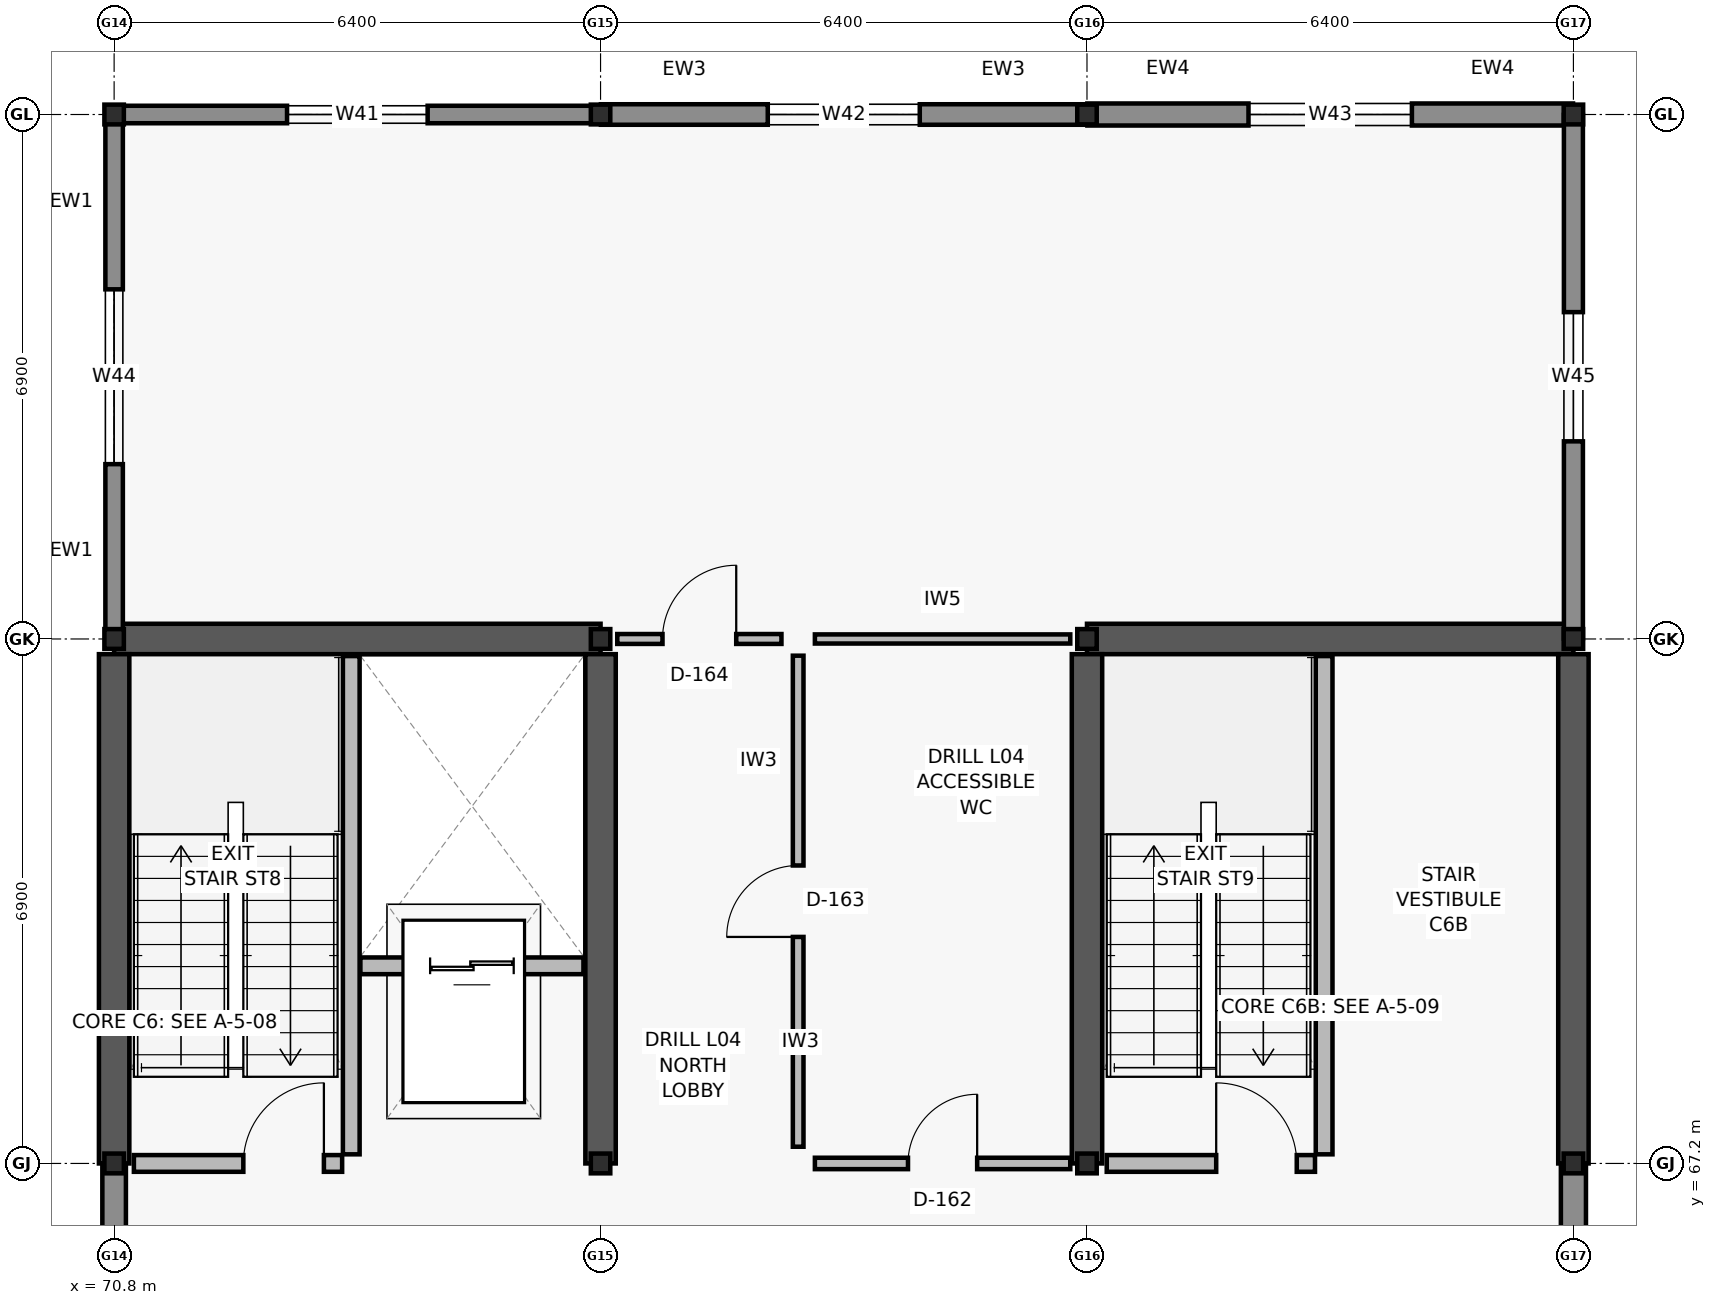
"""IFC4 building model, lengths in metres.
Left out: names, types, materials, properties, quantities, classifications, styles, units other than length and angle.
Written with IfcOpenShell. Run it as: python <this file> out.ifc"""

import sys

from ifc_helpers import new_model, si_unit, direction, frame, frame_2d, origin, origin_2d, place, context, subcontext, project, spatial, rectangle, i_section, extrude, element, fill, save


model = new_model("IFC4")
c1 = context("Model", 3, precision=1e-05, world=origin(), true_north=direction((0.0, 1.0)))
c2 = subcontext(c1, "Body", "Model", "MODEL_VIEW")
j1 = project(units=[si_unit("LENGTHUNIT", "METRE"), si_unit("PLANEANGLEUNIT", "RADIAN")], contexts=[c1])
p1 = place(None, origin())
s1 = spatial("IfcSite", under=j1, at=p1, CompositionType="ELEMENT")
p2 = place(p1, origin())
s2 = spatial("IfcBuilding", under=s1, at=p2, CompositionType="ELEMENT")
p3 = place(p2, frame((0.0, 0.0, 17.4)))
s3 = spatial("IfcBuildingStorey", under=s2, at=p3, CompositionType="ELEMENT", Elevation=17.4)
for number, where, z_axis, x_axis in (
    (1, (70.8, 67.2, 0.0), (0.0, 0.0, 1.0), (1.0, 0.0, 0.0)),
    (2, (70.8, 74.1, 0.0), (0.0, 0.0, 1.0), (1.0, 0.0, 0.0)),
    (3, (70.8, 81.0, 0.0), (0.0, 0.0, 1.0), (1.0, 0.0, 0.0)),
    (4, (77.2, 67.2, 0.0), (0.0, 0.0, 1.0), (1.0, 0.0, 0.0)),
    (5, (77.2, 74.1, 0.0), (0.0, 0.0, 1.0), (1.0, 0.0, 0.0)),
    (6, (77.2, 81.0, 0.0), (0.0, 0.0, 1.0), (1.0, 0.0, 0.0)),
    (7, (83.6, 67.2, 0.0), (0.0, 0.0, 1.0), (1.0, 0.0, 0.0)),
    (8, (83.6, 74.1, 0.0), (0.0, 0.0, 1.0), (1.0, 0.0, 0.0)),
    (9, (83.6, 81.0, 0.0), (0.0, 0.0, 1.0), (1.0, 0.0, 0.0)),
    (10, (90.0, 67.2, 0.0), (0.0, 0.0, 1.0), (1.0, 0.0, 0.0)),
    (11, (90.0, 74.1, 0.0), (0.0, 0.0, 1.0), (1.0, 0.0, 0.0)),
    (12, (90.0, 81.0, 0.0), (0.0, 0.0, 1.0), (1.0, 0.0, 0.0)),
):
    element("IfcColumn", number, at=place(p3, frame(where, z_axis=z_axis, x_axis=x_axis)), inside=s3, PredefinedType="COLUMN", context=c2, shape_type="SweptSolid", body=[
        extrude(i_section(OverallWidth=0.256, OverallDepth=0.26, WebThickness=0.01, FlangeThickness=0.017, FilletRadius=0.013, at=origin_2d()), origin(), (0.0, 0.0, 1.0), 3.9),
    ])
p4 = place(p3, frame((70.8, 74.1, 0.0), z_axis=(0.0, 0.0, 1.0), x_axis=(1.0, 0.0, 0.0)))
e13 = element("IfcWall", 13, at=p4, inside=s3, PredefinedType="SHEAR", context=c2, shape_type="SweptSolid", body=[
    extrude(rectangle(XDim=6.4, YDim=0.4, at=frame_2d((3.2, 0.0))), origin(), (0.0, 0.0, 1.0), 3.66),
])
for number, where, z_axis, x_axis in (
    (14, (70.8, 67.2, 0.0), (0.0, 0.0, 1.0), (0.0, 1.0, 0.0)),
    (15, (77.2, 67.2, 0.0), (0.0, 0.0, 1.0), (0.0, 1.0, 0.0)),
):
    element("IfcWall", number, at=place(p3, frame(where, z_axis=z_axis, x_axis=x_axis)), inside=s3, PredefinedType="SHEAR", context=c2, shape_type="SweptSolid", body=[
        extrude(rectangle(XDim=6.7, YDim=0.4, at=frame_2d((3.35, 0.0))), origin(), (0.0, 0.0, 1.0), 3.66),
    ])
p5 = place(p3, frame((83.6, 74.1, 0.0), z_axis=(0.0, 0.0, 1.0), x_axis=(1.0, 0.0, 0.0)))
e16 = element("IfcWall", 16, at=p5, inside=s3, PredefinedType="SHEAR", context=c2, shape_type="SweptSolid", body=[
    extrude(rectangle(XDim=6.4, YDim=0.4, at=frame_2d((3.2, 0.0))), origin(), (0.0, 0.0, 1.0), 3.66),
])
for number, where, z_axis, x_axis in (
    (17, (83.6, 67.2, 0.0), (0.0, 0.0, 1.0), (0.0, 1.0, 0.0)),
    (18, (90.0, 67.2, 0.0), (0.0, 0.0, 1.0), (0.0, 1.0, 0.0)),
):
    element("IfcWall", number, at=place(p3, frame(where, z_axis=z_axis, x_axis=x_axis)), inside=s3, PredefinedType="SHEAR", context=c2, shape_type="SweptSolid", body=[
        extrude(rectangle(XDim=6.7, YDim=0.4, at=frame_2d((3.35, 0.0))), origin(), (0.0, 0.0, 1.0), 3.66),
    ])
p6 = place(p3, frame((70.805, 81.0, 0.0), z_axis=(0.0, 0.0, 1.0), x_axis=(1.0, 0.0, 0.0)))
e19 = element("IfcWall", 19, at=p6, inside=s3, PredefinedType="SOLIDWALL", context=c2, shape_type="SweptSolid", body=[
    extrude(rectangle(XDim=6.39, YDim=0.23, at=frame_2d((3.195, 0.0))), origin(), (0.0, 0.0, 1.0), 3.02),
])
p7 = place(p6, frame((2.27, 0.0, 0.8)))
e20 = element("IfcOpeningElement", 20, at=p7, cuts=e19, PredefinedType="OPENING", context=c2, shape_type="SweptSolid", body=[
    extrude(rectangle(XDim=1.85, YDim=1.55, at=frame_2d((0.925, 0.775))), frame((0.0, 0.125, 0.0), z_axis=(0.0, -1.0, 0.0), x_axis=(1.0, 0.0, 0.0)), (0.0, 0.0, 1.0), 0.25),
])
p8 = place(p3, frame((77.205, 81.0, 0.0), z_axis=(0.0, 0.0, 1.0), x_axis=(1.0, 0.0, 0.0)))
e21 = element("IfcWall", 21, at=p8, inside=s3, PredefinedType="SOLIDWALL", context=c2, shape_type="SweptSolid", body=[
    extrude(rectangle(XDim=6.39, YDim=0.27, at=frame_2d((3.195, 0.0))), origin(), (0.0, 0.0, 1.0), 3.02),
])
p9 = place(p8, frame((2.195, 0.0, 0.8)))
e22 = element("IfcOpeningElement", 22, at=p9, cuts=e21, PredefinedType="OPENING", context=c2, shape_type="SweptSolid", body=[
    extrude(rectangle(XDim=2.0, YDim=1.55, at=frame_2d((1.0, 0.775))), frame((0.0, 0.145, 0.0), z_axis=(0.0, -1.0, 0.0), x_axis=(1.0, 0.0, 0.0)), (0.0, 0.0, 1.0), 0.29),
])
p10 = place(p3, frame((83.605, 81.0, 0.0), z_axis=(0.0, 0.0, 1.0), x_axis=(1.0, 0.0, 0.0)))
e23 = element("IfcWall", 23, at=p10, inside=s3, PredefinedType="SOLIDWALL", context=c2, shape_type="SweptSolid", body=[
    extrude(rectangle(XDim=6.39, YDim=0.29, at=frame_2d((3.195, 0.0))), origin(), (0.0, 0.0, 1.0), 3.02),
])
p11 = place(p10, frame((2.12, 0.0, 0.8)))
e24 = element("IfcOpeningElement", 24, at=p11, cuts=e23, PredefinedType="OPENING", context=c2, shape_type="SweptSolid", body=[
    extrude(rectangle(XDim=2.15, YDim=1.55, at=frame_2d((1.075, 0.775))), frame((0.0, 0.155, 0.0), z_axis=(0.0, -1.0, 0.0), x_axis=(1.0, 0.0, 0.0)), (0.0, 0.0, 1.0), 0.31),
])
p12 = place(p3, frame((70.8, 60.305, 0.0), z_axis=(0.0, 0.0, 1.0), x_axis=(0.0, 1.0, 0.0)))
e25 = element("IfcWall", 25, at=p12, inside=s3, PredefinedType="SOLIDWALL", context=c2, shape_type="SweptSolid", body=[
    extrude(rectangle(XDim=6.89, YDim=0.31, at=frame_2d((3.445, 0.0))), origin(), (0.0, 0.0, 1.0), 3.02),
])
p13 = place(p3, frame((90.0, 67.195, 0.0), z_axis=(0.0, 0.0, 1.0), x_axis=(0.0, -1.0, 0.0)))
e26 = element("IfcWall", 26, at=p13, inside=s3, PredefinedType="SOLIDWALL", context=c2, shape_type="SweptSolid", body=[
    extrude(rectangle(XDim=6.89, YDim=0.33, at=frame_2d((3.445, 0.0))), origin(), (0.0, 0.0, 1.0), 3.02),
])
p14 = place(p3, frame((70.8, 74.105, 0.0), z_axis=(0.0, 0.0, 1.0), x_axis=(0.0, 1.0, 0.0)))
e27 = element("IfcWall", 27, at=p14, inside=s3, PredefinedType="SOLIDWALL", context=c2, shape_type="SweptSolid", body=[
    extrude(rectangle(XDim=6.89, YDim=0.23, at=frame_2d((3.445, 0.0))), origin(), (0.0, 0.0, 1.0), 3.02),
])
p15 = place(p14, frame((2.295, 0.0, 0.8)))
e28 = element("IfcOpeningElement", 28, at=p15, cuts=e27, PredefinedType="OPENING", context=c2, shape_type="SweptSolid", body=[
    extrude(rectangle(XDim=2.3, YDim=1.55, at=frame_2d((1.15, 0.775))), frame((0.0, 0.125, 0.0), z_axis=(0.0, -1.0, 0.0), x_axis=(1.0, 0.0, 0.0)), (0.0, 0.0, 1.0), 0.25),
])
p16 = place(p3, frame((90.0, 80.995, 0.0), z_axis=(0.0, 0.0, 1.0), x_axis=(0.0, -1.0, 0.0)))
e29 = element("IfcWall", 29, at=p16, inside=s3, PredefinedType="SOLIDWALL", context=c2, shape_type="SweptSolid", body=[
    extrude(rectangle(XDim=6.89, YDim=0.25, at=frame_2d((3.445, 0.0))), origin(), (0.0, 0.0, 1.0), 3.02),
])
p17 = place(p16, frame((2.595, 0.0, 0.8)))
e30 = element("IfcOpeningElement", 30, at=p17, cuts=e29, PredefinedType="OPENING", context=c2, shape_type="SweptSolid", body=[
    extrude(rectangle(XDim=1.7, YDim=1.95, at=frame_2d((0.85, 0.975))), frame((0.0, 0.135, 0.0), z_axis=(0.0, -1.0, 0.0), x_axis=(1.0, 0.0, 0.0)), (0.0, 0.0, 1.0), 0.27),
])
p18 = place(p3, frame((73.92, 67.32, 0.0), z_axis=(0.0, 0.0, 1.0), x_axis=(0.0, 1.0, 0.0)))
e31 = element("IfcWall", 31, at=p18, inside=s3, PredefinedType="SOLIDWALL", context=c2, shape_type="SweptSolid", body=[
    extrude(rectangle(XDim=6.555, YDim=0.22, at=frame_2d((3.277, 0.0))), origin(), (0.0, 0.0, 1.0), 3.66),
])
p19 = place(p3, frame((71.06, 67.2, 0.0), z_axis=(0.0, 0.0, 1.0), x_axis=(1.0, 0.0, 0.0)))
e32 = element("IfcWall", 32, at=p19, inside=s3, PredefinedType="SOLIDWALL", context=c2, shape_type="SweptSolid", body=[
    extrude(rectangle(XDim=2.74, YDim=0.22, at=frame_2d((1.37, 0.0))), origin(), (0.0, 0.0, 1.0), 3.02),
])
p20 = place(p19, frame((1.44, 0.0, 0.0)))
e33 = element("IfcOpeningElement", 33, at=p20, cuts=e32, PredefinedType="OPENING", context=c2, shape_type="SweptSolid", body=[
    extrude(rectangle(XDim=1.06, YDim=2.1, at=frame_2d((0.53, 1.05))), frame((0.0, 0.12, 0.0), z_axis=(0.0, -1.0, 0.0), x_axis=(1.0, 0.0, 0.0)), (0.0, 0.0, 1.0), 0.24),
])
p21 = place(p3, frame((74.04, 69.8, 0.0), z_axis=(0.0, 0.0, 1.0), x_axis=(1.0, 0.0, 0.0)))
e34 = element("IfcWall", 34, at=p21, inside=s3, PredefinedType="SOLIDWALL", context=c2, shape_type="SweptSolid", body=[
    extrude(rectangle(XDim=2.935, YDim=0.22, at=frame_2d((1.468, 0.0))), origin(), (0.0, 0.0, 1.0), 3.66),
])
p22 = place(p21, frame((0.917, 0.0, 0.0)))
e35 = element("IfcOpeningElement", 35, at=p22, cuts=e34, PredefinedType="OPENING", context=c2, shape_type="SweptSolid", body=[
    extrude(rectangle(XDim=1.1, YDim=2.1, at=frame_2d((0.55, 1.05))), frame((0.0, 0.12, 0.0), z_axis=(0.0, -1.0, 0.0), x_axis=(1.0, 0.0, 0.0)), (0.0, 0.0, 1.0), 0.24),
])
p23 = place(p3, frame((86.72, 67.32, 0.0), z_axis=(0.0, 0.0, 1.0), x_axis=(0.0, 1.0, 0.0)))
e36 = element("IfcWall", 36, at=p23, inside=s3, PredefinedType="SOLIDWALL", context=c2, shape_type="SweptSolid", body=[
    extrude(rectangle(XDim=6.555, YDim=0.22, at=frame_2d((3.277, 0.0))), origin(), (0.0, 0.0, 1.0), 3.66),
])
p24 = place(p3, frame((83.86, 67.2, 0.0), z_axis=(0.0, 0.0, 1.0), x_axis=(1.0, 0.0, 0.0)))
e37 = element("IfcWall", 37, at=p24, inside=s3, PredefinedType="SOLIDWALL", context=c2, shape_type="SweptSolid", body=[
    extrude(rectangle(XDim=2.74, YDim=0.22, at=frame_2d((1.37, 0.0))), origin(), (0.0, 0.0, 1.0), 3.02),
])
p25 = place(p24, frame((1.44, 0.0, 0.0)))
e38 = element("IfcOpeningElement", 38, at=p25, cuts=e37, PredefinedType="OPENING", context=c2, shape_type="SweptSolid", body=[
    extrude(rectangle(XDim=1.06, YDim=2.1, at=frame_2d((0.53, 1.05))), frame((0.0, 0.12, 0.0), z_axis=(0.0, -1.0, 0.0), x_axis=(1.0, 0.0, 0.0)), (0.0, 0.0, 1.0), 0.24),
])
p26 = place(p3, frame((80.02, 67.2, 0.0), z_axis=(0.0, 0.0, 1.0), x_axis=(1.0, 0.0, 0.0)))
e39 = element("IfcWall", 39, at=p26, inside=s3, PredefinedType="PARTITIONING", context=c2, shape_type="SweptSolid", body=[
    extrude(rectangle(XDim=3.36, YDim=0.15, at=frame_2d((1.68, 0.0))), origin(), (0.0, 0.0, 1.0), 3.0),
])
p27 = place(p26, frame((1.225, 0.0, 0.0)))
e40 = element("IfcOpeningElement", 40, at=p27, cuts=e39, PredefinedType="OPENING", context=c2, shape_type="SweptSolid", body=[
    extrude(rectangle(XDim=0.91, YDim=2.06, at=frame_2d((0.455, 1.03))), frame((0.0, 0.085, 0.0), z_axis=(0.0, -1.0, 0.0), x_axis=(1.0, 0.0, 0.0)), (0.0, 0.0, 1.0), 0.17),
])
p28 = place(p3, frame((79.8, 67.42, 0.0), z_axis=(0.0, 0.0, 1.0), x_axis=(0.0, 1.0, 0.0)))
e41 = element("IfcWall", 41, at=p28, inside=s3, PredefinedType="PARTITIONING", context=c2, shape_type="SweptSolid", body=[
    extrude(rectangle(XDim=6.46, YDim=0.14, at=frame_2d((3.23, 0.0))), origin(), (0.0, 0.0, 1.0), 3.0),
])
p29 = place(p28, frame((2.76, 0.0, 0.0)))
e42 = element("IfcOpeningElement", 42, at=p29, cuts=e41, PredefinedType="OPENING", context=c2, shape_type="SweptSolid", body=[
    extrude(rectangle(XDim=0.94, YDim=2.08, at=frame_2d((0.47, 1.04))), frame((0.0, 0.08, 0.0), z_axis=(0.0, -1.0, 0.0), x_axis=(1.0, 0.0, 0.0)), (0.0, 0.0, 1.0), 0.16),
])
p30 = place(p3, frame((77.42, 74.1, 0.0), z_axis=(0.0, 0.0, 1.0), x_axis=(1.0, 0.0, 0.0)))
e43 = element("IfcWall", 43, at=p30, inside=s3, PredefinedType="PARTITIONING", context=c2, shape_type="SweptSolid", body=[
    extrude(rectangle(XDim=2.16, YDim=0.13, at=frame_2d((1.08, 0.0))), origin(), (0.0, 0.0, 1.0), 3.0),
])
p31 = place(p30, frame((0.595, 0.0, 0.0)))
e44 = element("IfcOpeningElement", 44, at=p31, cuts=e43, PredefinedType="OPENING", context=c2, shape_type="SweptSolid", body=[
    extrude(rectangle(XDim=0.97, YDim=2.1, at=frame_2d((0.485, 1.05))), frame((0.0, 0.075, 0.0), z_axis=(0.0, -1.0, 0.0), x_axis=(1.0, 0.0, 0.0)), (0.0, 0.0, 1.0), 0.15),
])
p32 = place(p3, frame((80.02, 74.1, 0.0), z_axis=(0.0, 0.0, 1.0), x_axis=(1.0, 0.0, 0.0)))
e45 = element("IfcWall", 45, at=p32, inside=s3, PredefinedType="PARTITIONING", context=c2, shape_type="SweptSolid", body=[
    extrude(rectangle(XDim=3.36, YDim=0.12, at=frame_2d((1.68, 0.0))), origin(), (0.0, 0.0, 1.0), 3.0),
])
p33 = place(p7, origin())
e46 = element("IfcWindow", 46, at=p33, inside=s3, PartitioningType="DOUBLE_PANEL_VERTICAL", PredefinedType="WINDOW", context=c2, shape_type="SweptSolid", body=[
    extrude(rectangle(XDim=1.85, YDim=1.55, at=frame_2d((0.925, 0.775))), frame((0.0, 0.03, 0.0), z_axis=(0.0, -1.0, 0.0), x_axis=(1.0, 0.0, 0.0)), (0.0, 0.0, 1.0), 0.06),
])
fill(e20, e46)
p34 = place(p9, origin())
e47 = element("IfcWindow", 47, at=p34, inside=s3, PartitioningType="DOUBLE_PANEL_VERTICAL", PredefinedType="WINDOW", context=c2, shape_type="SweptSolid", body=[
    extrude(rectangle(XDim=2.0, YDim=1.55, at=frame_2d((1.0, 0.775))), frame((0.0, 0.03, 0.0), z_axis=(0.0, -1.0, 0.0), x_axis=(1.0, 0.0, 0.0)), (0.0, 0.0, 1.0), 0.06),
])
fill(e22, e47)
p35 = place(p11, origin())
e48 = element("IfcWindow", 48, at=p35, inside=s3, PartitioningType="DOUBLE_PANEL_VERTICAL", PredefinedType="WINDOW", context=c2, shape_type="SweptSolid", body=[
    extrude(rectangle(XDim=2.15, YDim=1.55, at=frame_2d((1.075, 0.775))), frame((0.0, 0.03, 0.0), z_axis=(0.0, -1.0, 0.0), x_axis=(1.0, 0.0, 0.0)), (0.0, 0.0, 1.0), 0.06),
])
fill(e24, e48)
p36 = place(p15, origin())
e49 = element("IfcWindow", 49, at=p36, inside=s3, PartitioningType="DOUBLE_PANEL_VERTICAL", PredefinedType="WINDOW", context=c2, shape_type="SweptSolid", body=[
    extrude(rectangle(XDim=2.3, YDim=1.55, at=frame_2d((1.15, 0.775))), frame((0.0, 0.03, 0.0), z_axis=(0.0, -1.0, 0.0), x_axis=(1.0, 0.0, 0.0)), (0.0, 0.0, 1.0), 0.06),
])
fill(e28, e49)
p37 = place(p17, origin())
e50 = element("IfcWindow", 50, at=p37, inside=s3, PartitioningType="DOUBLE_PANEL_VERTICAL", PredefinedType="WINDOW", context=c2, shape_type="SweptSolid", body=[
    extrude(rectangle(XDim=1.7, YDim=1.95, at=frame_2d((0.85, 0.975))), frame((0.0, 0.03, 0.0), z_axis=(0.0, -1.0, 0.0), x_axis=(1.0, 0.0, 0.0)), (0.0, 0.0, 1.0), 0.06),
])
fill(e30, e50)
p38 = place(p20, origin())
e51 = element("IfcDoor", 51, at=p38, inside=s3, OperationType="SINGLE_SWING_RIGHT", PredefinedType="DOOR", context=c2, shape_type="SweptSolid", body=[
    extrude(rectangle(XDim=1.06, YDim=2.1, at=frame_2d((0.53, 1.05))), frame((0.0, 0.025, 0.0), z_axis=(0.0, -1.0, 0.0), x_axis=(1.0, 0.0, 0.0)), (0.0, 0.0, 1.0), 0.05),
])
fill(e33, e51)
p39 = place(p22, origin())
e52 = element("IfcDoor", 52, at=p39, inside=s3, OperationType="DOUBLE_DOOR_SLIDING", PredefinedType="DOOR", context=c2, shape_type="SweptSolid", body=[
    extrude(rectangle(XDim=1.1, YDim=2.1, at=frame_2d((0.55, 1.05))), frame((0.0, 0.025, 0.0), z_axis=(0.0, -1.0, 0.0), x_axis=(1.0, 0.0, 0.0)), (0.0, 0.0, 1.0), 0.05),
])
fill(e35, e52)
p40 = place(p25, origin())
e53 = element("IfcDoor", 53, at=p40, inside=s3, OperationType="SINGLE_SWING_LEFT", PredefinedType="DOOR", context=c2, shape_type="SweptSolid", body=[
    extrude(rectangle(XDim=1.06, YDim=2.1, at=frame_2d((0.53, 1.05))), frame((0.0, 0.025, 0.0), z_axis=(0.0, -1.0, 0.0), x_axis=(1.0, 0.0, 0.0)), (0.0, 0.0, 1.0), 0.05),
])
fill(e38, e53)
p41 = place(p27, origin())
e54 = element("IfcDoor", 54, at=p41, inside=s3, OperationType="SINGLE_SWING_RIGHT", PredefinedType="DOOR", context=c2, shape_type="SweptSolid", body=[
    extrude(rectangle(XDim=0.91, YDim=2.06, at=frame_2d((0.455, 1.03))), frame((0.0, 0.025, 0.0), z_axis=(0.0, -1.0, 0.0), x_axis=(1.0, 0.0, 0.0)), (0.0, 0.0, 1.0), 0.05),
])
fill(e40, e54)
p42 = place(p29, origin())
e55 = element("IfcDoor", 55, at=p42, inside=s3, OperationType="SINGLE_SWING_LEFT", PredefinedType="DOOR", context=c2, shape_type="SweptSolid", body=[
    extrude(rectangle(XDim=0.94, YDim=2.08, at=frame_2d((0.47, 1.04))), frame((0.0, 0.025, 0.0), z_axis=(0.0, -1.0, 0.0), x_axis=(1.0, 0.0, 0.0)), (0.0, 0.0, 1.0), 0.05),
])
fill(e42, e55)
p43 = place(p31, origin())
e56 = element("IfcDoor", 56, at=p43, inside=s3, OperationType="SINGLE_SWING_RIGHT", PredefinedType="DOOR", context=c2, shape_type="SweptSolid", body=[
    extrude(rectangle(XDim=0.97, YDim=2.1, at=frame_2d((0.485, 1.05))), frame((0.0, 0.025, 0.0), z_axis=(0.0, -1.0, 0.0), x_axis=(1.0, 0.0, 0.0)), (0.0, 0.0, 1.0), 0.05),
])
fill(e44, e56)
save(model, sys.argv[1])
